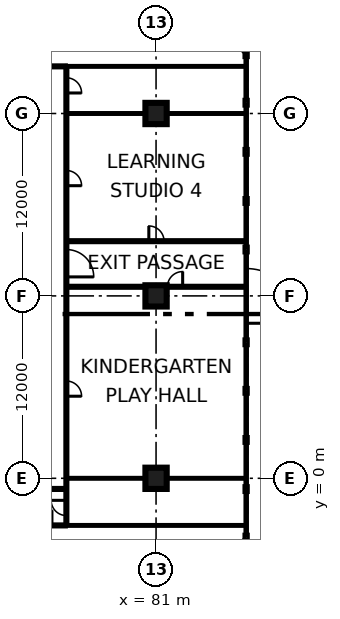
"""IFC4 building model, lengths in metres.
Left out: names, types, materials, properties, quantities, classifications, styles, units other than length and angle.
Written with IfcOpenShell. Run it as: python <this file> out.ifc"""

import sys

from ifc_helpers import new_model, si_unit, direction, frame, frame_2d, origin, origin_2d, place, context, subcontext, project, spatial, rectangle, extrude, element, fill, save


model = new_model("IFC4")
c1 = context("Model", 3, precision=1e-05, world=origin(), true_north=direction((0.0, 1.0)))
c2 = subcontext(c1, "Body", "Model", "MODEL_VIEW")
j1 = project(units=[si_unit("LENGTHUNIT", "METRE"), si_unit("PLANEANGLEUNIT", "RADIAN")], contexts=[c1])
p1 = place(None, origin())
s1 = spatial("IfcSite", under=j1, at=p1, CompositionType="ELEMENT")
p2 = place(p1, origin())
s2 = spatial("IfcBuilding", under=s1, at=p2, CompositionType="ELEMENT")
p3 = place(p2, origin())
s3 = spatial("IfcBuildingStorey", under=s2, at=p3, CompositionType="ELEMENT", Elevation=0.0)
for number, where, z_axis, x_axis in (
    (1, (81.0, 0.0, 0.0), (0.0, 0.0, 1.0), (1.0, 0.0, 0.0)),
    (2, (81.0, 12.0, 0.0), (0.0, 0.0, 1.0), (1.0, 0.0, 0.0)),
    (3, (81.0, 24.0, 0.0), (0.0, 0.0, 1.0), (1.0, 0.0, 0.0)),
):
    element("IfcColumn", number, at=place(p3, frame(where, z_axis=z_axis, x_axis=x_axis)), inside=s3, PredefinedType="COLUMN", context=c2, shape_type="SweptSolid", body=[
        extrude(rectangle(XDim=1.4, YDim=1.4, at=origin_2d()), origin(), (0.0, 0.0, 1.0), 7.2),
    ])
p4 = place(p3, frame((86.925, 9.0, 0.0), z_axis=(0.0, 0.0, 1.0), x_axis=(0.0, 1.0, 0.0)))
e4 = element("IfcWall", 4, at=p4, inside=s3, PredefinedType="SOLIDWALL", context=c2, shape_type="SweptSolid", body=[
    extrude(rectangle(XDim=6.0, YDim=0.15, at=frame_2d((3.0, 0.0))), origin(), (0.0, 0.0, 1.0), 6.8),
])
p5 = place(p4, frame((1.2, 0.0, 0.0)))
e5 = element("IfcOpeningElement", 5, at=p5, cuts=e4, PredefinedType="OPENING", context=c2, shape_type="SweptSolid", body=[
    extrude(rectangle(XDim=3.6, YDim=2.8, at=frame_2d((1.8, 1.4))), frame((0.0, 0.085, 0.0), z_axis=(0.0, -1.0, 0.0), x_axis=(1.0, 0.0, 0.0)), (0.0, 0.0, 1.0), 0.17),
])
p6 = place(p3, frame((-3.2, -3.1, 0.0), z_axis=(0.0, 0.0, 1.0), x_axis=(1.0, 0.0, 0.0)))
e6 = element("IfcWall", 6, at=p6, inside=s3, PredefinedType="PARTITIONING", context=c2, shape_type="SweptSolid", body=[
    extrude(rectangle(XDim=78.3, YDim=0.2, at=frame_2d((39.15, 0.0))), origin(), (0.0, 0.0, 1.0), 6.8),
])
p7 = place(p6, frame((70.1, 0.0, 0.0)))
e7 = element("IfcOpeningElement", 7, at=p7, cuts=e6, PredefinedType="OPENING", context=c2, shape_type="SweptSolid", body=[
    extrude(rectangle(XDim=1.0, YDim=2.1, at=frame_2d((0.5, 1.05))), frame((0.0, 0.11, 0.0), z_axis=(0.0, -1.0, 0.0), x_axis=(1.0, 0.0, 0.0)), (0.0, 0.0, 1.0), 0.22),
])
p8 = place(p6, frame((66.35, 0.0, 0.0)))
e8 = element("IfcOpeningElement", 8, at=p8, cuts=e6, PredefinedType="OPENING", context=c2, shape_type="SweptSolid", body=[
    extrude(rectangle(XDim=1.0, YDim=2.1, at=frame_2d((0.5, 1.05))), frame((0.0, 0.11, 0.0), z_axis=(0.0, -1.0, 0.0), x_axis=(1.0, 0.0, 0.0)), (0.0, 0.0, 1.0), 0.22),
])
p9 = place(p6, frame((76.35, 0.0, 0.0)))
e9 = element("IfcOpeningElement", 9, at=p9, cuts=e6, PredefinedType="OPENING", context=c2, shape_type="SweptSolid", body=[
    extrude(rectangle(XDim=1.0, YDim=2.1, at=frame_2d((0.5, 1.05))), frame((0.0, 0.11, 0.0), z_axis=(0.0, -1.0, 0.0), x_axis=(1.0, 0.0, 0.0)), (0.0, 0.0, 1.0), 0.22),
])
p10 = place(p6, frame((8.6, 0.0, 0.0)))
e10 = element("IfcOpeningElement", 10, at=p10, cuts=e6, PredefinedType="OPENING", context=c2, shape_type="SweptSolid", body=[
    extrude(rectangle(XDim=1.0, YDim=2.1, at=frame_2d((0.5, 1.05))), frame((0.0, 0.11, 0.0), z_axis=(0.0, -1.0, 0.0), x_axis=(1.0, 0.0, 0.0)), (0.0, 0.0, 1.0), 0.22),
])
p11 = place(p6, frame((3.35, 0.0, 0.0)))
e11 = element("IfcOpeningElement", 11, at=p11, cuts=e6, PredefinedType="OPENING", context=c2, shape_type="SweptSolid", body=[
    extrude(rectangle(XDim=1.0, YDim=2.1, at=frame_2d((0.5, 1.05))), frame((0.0, 0.11, 0.0), z_axis=(0.0, -1.0, 0.0), x_axis=(1.0, 0.0, 0.0)), (0.0, 0.0, 1.0), 0.22),
])
p12 = place(p6, frame((20.6, 0.0, 0.0)))
e12 = element("IfcOpeningElement", 12, at=p12, cuts=e6, PredefinedType="OPENING", context=c2, shape_type="SweptSolid", body=[
    extrude(rectangle(XDim=1.0, YDim=2.1, at=frame_2d((0.5, 1.05))), frame((0.0, 0.11, 0.0), z_axis=(0.0, -1.0, 0.0), x_axis=(1.0, 0.0, 0.0)), (0.0, 0.0, 1.0), 0.22),
])
p13 = place(p6, frame((15.35, 0.0, 0.0)))
e13 = element("IfcOpeningElement", 13, at=p13, cuts=e6, PredefinedType="OPENING", context=c2, shape_type="SweptSolid", body=[
    extrude(rectangle(XDim=1.0, YDim=2.1, at=frame_2d((0.5, 1.05))), frame((0.0, 0.11, 0.0), z_axis=(0.0, -1.0, 0.0), x_axis=(1.0, 0.0, 0.0)), (0.0, 0.0, 1.0), 0.22),
])
p14 = place(p6, frame((32.6, 0.0, 0.0)))
e14 = element("IfcOpeningElement", 14, at=p14, cuts=e6, PredefinedType="OPENING", context=c2, shape_type="SweptSolid", body=[
    extrude(rectangle(XDim=1.0, YDim=2.1, at=frame_2d((0.5, 1.05))), frame((0.0, 0.11, 0.0), z_axis=(0.0, -1.0, 0.0), x_axis=(1.0, 0.0, 0.0)), (0.0, 0.0, 1.0), 0.22),
])
p15 = place(p6, frame((27.35, 0.0, 0.0)))
e15 = element("IfcOpeningElement", 15, at=p15, cuts=e6, PredefinedType="OPENING", context=c2, shape_type="SweptSolid", body=[
    extrude(rectangle(XDim=1.0, YDim=2.1, at=frame_2d((0.5, 1.05))), frame((0.0, 0.11, 0.0), z_axis=(0.0, -1.0, 0.0), x_axis=(1.0, 0.0, 0.0)), (0.0, 0.0, 1.0), 0.22),
])
p16 = place(p6, frame((44.85, 0.0, 0.0)))
e16 = element("IfcOpeningElement", 16, at=p16, cuts=e6, PredefinedType="OPENING", context=c2, shape_type="SweptSolid", body=[
    extrude(rectangle(XDim=1.8, YDim=2.1, at=frame_2d((0.9, 1.05))), frame((0.0, 0.11, 0.0), z_axis=(0.0, -1.0, 0.0), x_axis=(1.0, 0.0, 0.0)), (0.0, 0.0, 1.0), 0.22),
])
p17 = place(p6, frame((50.15, 0.0, 0.0)))
e17 = element("IfcOpeningElement", 17, at=p17, cuts=e6, PredefinedType="OPENING", context=c2, shape_type="SweptSolid", body=[
    extrude(rectangle(XDim=1.8, YDim=2.1, at=frame_2d((0.9, 1.05))), frame((0.0, 0.11, 0.0), z_axis=(0.0, -1.0, 0.0), x_axis=(1.0, 0.0, 0.0)), (0.0, 0.0, 1.0), 0.22),
])
p18 = place(p6, frame((53.75, 0.0, 0.0)))
e18 = element("IfcOpeningElement", 18, at=p18, cuts=e6, PredefinedType="OPENING", context=c2, shape_type="SweptSolid", body=[
    extrude(rectangle(XDim=1.8, YDim=2.1, at=frame_2d((0.9, 1.05))), frame((0.0, 0.11, 0.0), z_axis=(0.0, -1.0, 0.0), x_axis=(1.0, 0.0, 0.0)), (0.0, 0.0, 1.0), 0.22),
])
p19 = place(p3, frame((38.3, 27.1, 0.0), z_axis=(0.0, 0.0, 1.0), x_axis=(1.0, 0.0, 0.0)))
e19 = element("IfcWall", 19, at=p19, inside=s3, PredefinedType="PARTITIONING", context=c2, shape_type="SweptSolid", body=[
    extrude(rectangle(XDim=36.8, YDim=0.2, at=frame_2d((18.4, 0.0))), origin(), (0.0, 0.0, 1.0), 6.8),
])
p20 = place(p19, frame((10.8, 0.0, 0.0)))
e20 = element("IfcOpeningElement", 20, at=p20, cuts=e19, PredefinedType="OPENING", context=c2, shape_type="SweptSolid", body=[
    extrude(rectangle(XDim=1.0, YDim=2.1, at=frame_2d((0.5, 1.05))), frame((0.0, 0.11, 0.0), z_axis=(0.0, -1.0, 0.0), x_axis=(1.0, 0.0, 0.0)), (0.0, 0.0, 1.0), 0.22),
])
p21 = place(p19, frame((19.8, 0.0, 0.0)))
e21 = element("IfcOpeningElement", 21, at=p21, cuts=e19, PredefinedType="OPENING", context=c2, shape_type="SweptSolid", body=[
    extrude(rectangle(XDim=1.0, YDim=2.1, at=frame_2d((0.5, 1.05))), frame((0.0, 0.11, 0.0), z_axis=(0.0, -1.0, 0.0), x_axis=(1.0, 0.0, 0.0)), (0.0, 0.0, 1.0), 0.22),
])
p22 = place(p19, frame((28.8, 0.0, 0.0)))
e22 = element("IfcOpeningElement", 22, at=p22, cuts=e19, PredefinedType="OPENING", context=c2, shape_type="SweptSolid", body=[
    extrude(rectangle(XDim=1.0, YDim=2.1, at=frame_2d((0.5, 1.05))), frame((0.0, 0.11, 0.0), z_axis=(0.0, -1.0, 0.0), x_axis=(1.0, 0.0, 0.0)), (0.0, 0.0, 1.0), 0.22),
])
p23 = place(p3, frame((54.0, -0.7, 0.0), z_axis=(0.0, 0.0, 1.0), x_axis=(1.0, 0.0, 0.0)))
e23 = element("IfcWall", 23, at=p23, inside=s3, PredefinedType="PARTITIONING", context=c2, shape_type="SweptSolid", body=[
    extrude(rectangle(XDim=21.0, YDim=0.2, at=frame_2d((10.5, 0.0))), origin(), (0.0, 0.0, 1.0), 6.8),
])
p24 = place(p23, frame((4.1, 0.0, 0.0)))
e24 = element("IfcOpeningElement", 24, at=p24, cuts=e23, PredefinedType="OPENING", context=c2, shape_type="SweptSolid", body=[
    extrude(rectangle(XDim=1.0, YDim=2.1, at=frame_2d((0.5, 1.05))), frame((0.0, 0.11, 0.0), z_axis=(0.0, -1.0, 0.0), x_axis=(1.0, 0.0, 0.0)), (0.0, 0.0, 1.0), 0.22),
])
p25 = place(p3, frame((75.1, -3.1, 0.0), z_axis=(0.0, 0.0, 1.0), x_axis=(1.0, 0.0, 0.0)))
e25 = element("IfcWall", 25, at=p25, inside=s3, PredefinedType="PARTITIONING", context=c2, shape_type="SweptSolid", body=[
    extrude(rectangle(XDim=11.825, YDim=0.125, at=frame_2d((5.913, 0.0))), origin(), (0.0, 0.0, 1.0), 6.8),
])
p26 = place(p3, frame((75.1, -3.0, 0.0), z_axis=(0.0, 0.0, 1.0), x_axis=(0.0, 1.0, 0.0)))
e26 = element("IfcWall", 26, at=p26, inside=s3, PredefinedType="PARTITIONING", context=c2, shape_type="SweptSolid", body=[
    extrude(rectangle(XDim=30.0, YDim=0.2, at=frame_2d((15.0, 0.0))), origin(), (0.0, 0.0, 1.0), 6.8),
])
p27 = place(p26, frame((0.55, 0.0, 0.0)))
e27 = element("IfcOpeningElement", 27, at=p27, cuts=e26, PredefinedType="OPENING", context=c2, shape_type="SweptSolid", body=[
    extrude(rectangle(XDim=1.0, YDim=2.1, at=frame_2d((0.5, 1.05))), frame((0.0, 0.11, 0.0), z_axis=(0.0, -1.0, 0.0), x_axis=(1.0, 0.0, 0.0)), (0.0, 0.0, 1.0), 0.22),
])
p28 = place(p26, frame((8.4, 0.0, 0.0)))
e28 = element("IfcOpeningElement", 28, at=p28, cuts=e26, PredefinedType="OPENING", context=c2, shape_type="SweptSolid", body=[
    extrude(rectangle(XDim=1.0, YDim=2.1, at=frame_2d((0.5, 1.05))), frame((0.0, 0.11, 0.0), z_axis=(0.0, -1.0, 0.0), x_axis=(1.0, 0.0, 0.0)), (0.0, 0.0, 1.0), 0.22),
])
p29 = place(p26, frame((22.25, 0.0, 0.0)))
e29 = element("IfcOpeningElement", 29, at=p29, cuts=e26, PredefinedType="OPENING", context=c2, shape_type="SweptSolid", body=[
    extrude(rectangle(XDim=1.0, YDim=2.1, at=frame_2d((0.5, 1.05))), frame((0.0, 0.11, 0.0), z_axis=(0.0, -1.0, 0.0), x_axis=(1.0, 0.0, 0.0)), (0.0, 0.0, 1.0), 0.22),
])
p30 = place(p26, frame((28.35, 0.0, 0.0)))
e30 = element("IfcOpeningElement", 30, at=p30, cuts=e26, PredefinedType="OPENING", context=c2, shape_type="SweptSolid", body=[
    extrude(rectangle(XDim=1.0, YDim=2.1, at=frame_2d((0.5, 1.05))), frame((0.0, 0.11, 0.0), z_axis=(0.0, -1.0, 0.0), x_axis=(1.0, 0.0, 0.0)), (0.0, 0.0, 1.0), 0.22),
])
p31 = place(p26, frame((16.25, 0.0, 0.0)))
e31 = element("IfcOpeningElement", 31, at=p31, cuts=e26, PredefinedType="OPENING", context=c2, shape_type="SweptSolid", body=[
    extrude(rectangle(XDim=1.8, YDim=2.1, at=frame_2d((0.9, 1.05))), frame((0.0, 0.11, 0.0), z_axis=(0.0, -1.0, 0.0), x_axis=(1.0, 0.0, 0.0)), (0.0, 0.0, 1.0), 0.22),
])
p32 = place(p3, frame((75.1, 27.1, 0.0), z_axis=(0.0, 0.0, 1.0), x_axis=(1.0, 0.0, 0.0)))
e32 = element("IfcWall", 32, at=p32, inside=s3, PredefinedType="PARTITIONING", context=c2, shape_type="SweptSolid", body=[
    extrude(rectangle(XDim=11.825, YDim=0.125, at=frame_2d((5.913, 0.0))), origin(), (0.0, 0.0, 1.0), 6.8),
])
p33 = place(p3, frame((75.2, 0.0, 0.0), z_axis=(0.0, 0.0, 1.0), x_axis=(1.0, 0.0, 0.0)))
e33 = element("IfcWall", 33, at=p33, inside=s3, PredefinedType="PARTITIONING", context=c2, shape_type="SweptSolid", body=[
    extrude(rectangle(XDim=11.725, YDim=0.125, at=frame_2d((5.863, 0.0))), origin(), (0.0, 0.0, 1.0), 6.8),
])
p34 = place(p3, frame((75.2, 12.6, 0.0), z_axis=(0.0, 0.0, 1.0), x_axis=(1.0, 0.0, 0.0)))
e34 = element("IfcWall", 34, at=p34, inside=s3, PredefinedType="PARTITIONING", context=c2, shape_type="SweptSolid", body=[
    extrude(rectangle(XDim=11.651, YDim=0.2, at=frame_2d((5.826, 0.0))), origin(), (0.0, 0.0, 1.0), 6.8),
])
p35 = place(p34, frame((6.55, 0.0, 0.0)))
e35 = element("IfcOpeningElement", 35, at=p35, cuts=e34, PredefinedType="OPENING", context=c2, shape_type="SweptSolid", body=[
    extrude(rectangle(XDim=1.0, YDim=2.1, at=frame_2d((0.5, 1.05))), frame((0.0, 0.11, 0.0), z_axis=(0.0, -1.0, 0.0), x_axis=(1.0, 0.0, 0.0)), (0.0, 0.0, 1.0), 0.22),
])
p36 = place(p3, frame((75.2, 15.6, 0.0), z_axis=(0.0, 0.0, 1.0), x_axis=(1.0, 0.0, 0.0)))
e36 = element("IfcWall", 36, at=p36, inside=s3, PredefinedType="PARTITIONING", context=c2, shape_type="SweptSolid", body=[
    extrude(rectangle(XDim=11.725, YDim=0.2, at=frame_2d((5.863, 0.0))), origin(), (0.0, 0.0, 1.0), 6.8),
])
p37 = place(p36, frame((5.325, 0.0, 0.0)))
e37 = element("IfcOpeningElement", 37, at=p37, cuts=e36, PredefinedType="OPENING", context=c2, shape_type="SweptSolid", body=[
    extrude(rectangle(XDim=1.0, YDim=2.1, at=frame_2d((0.5, 1.05))), frame((0.0, 0.11, 0.0), z_axis=(0.0, -1.0, 0.0), x_axis=(1.0, 0.0, 0.0)), (0.0, 0.0, 1.0), 0.22),
])
p38 = place(p3, frame((75.2, 24.0, 0.0), z_axis=(0.0, 0.0, 1.0), x_axis=(1.0, 0.0, 0.0)))
e38 = element("IfcWall", 38, at=p38, inside=s3, PredefinedType="PARTITIONING", context=c2, shape_type="SweptSolid", body=[
    extrude(rectangle(XDim=11.725, YDim=0.125, at=frame_2d((5.863, 0.0))), origin(), (0.0, 0.0, 1.0), 6.8),
])
p39 = place(p5, frame((3.6, 0.0, 0.0), z_axis=(0.0, 0.0, 1.0), x_axis=(-1.0, 0.0, 0.0)))
e39 = element("IfcDoor", 39, at=p39, inside=s3, OperationType="DOUBLE_DOOR_SINGLE_SWING", PredefinedType="DOOR", context=c2, shape_type="SweptSolid", body=[
    extrude(rectangle(XDim=3.6, YDim=2.8, at=frame_2d((1.8, 1.4))), frame((0.0, 0.025, 0.0), z_axis=(0.0, -1.0, 0.0), x_axis=(1.0, 0.0, 0.0)), (0.0, 0.0, 1.0), 0.05),
])
fill(e5, e39)
p40 = place(p27, frame((1.0, 0.0, 0.0), z_axis=(0.0, 0.0, 1.0), x_axis=(-1.0, 0.0, 0.0)))
e40 = element("IfcDoor", 40, at=p40, inside=s3, OperationType="SINGLE_SWING_RIGHT", PredefinedType="DOOR", context=c2, shape_type="SweptSolid", body=[
    extrude(rectangle(XDim=1.0, YDim=2.1, at=frame_2d((0.5, 1.05))), frame((0.0, 0.025, 0.0), z_axis=(0.0, -1.0, 0.0), x_axis=(1.0, 0.0, 0.0)), (0.0, 0.0, 1.0), 0.05),
])
fill(e27, e40)
p41 = place(p28, frame((1.0, 0.0, 0.0), z_axis=(0.0, 0.0, 1.0), x_axis=(-1.0, 0.0, 0.0)))
e41 = element("IfcDoor", 41, at=p41, inside=s3, OperationType="SINGLE_SWING_LEFT", PredefinedType="DOOR", context=c2, shape_type="SweptSolid", body=[
    extrude(rectangle(XDim=1.0, YDim=2.1, at=frame_2d((0.5, 1.05))), frame((0.0, 0.025, 0.0), z_axis=(0.0, -1.0, 0.0), x_axis=(1.0, 0.0, 0.0)), (0.0, 0.0, 1.0), 0.05),
])
fill(e28, e41)
p42 = place(p35, frame((1.0, 0.0, 0.0), z_axis=(0.0, 0.0, 1.0), x_axis=(-1.0, 0.0, 0.0)))
e42 = element("IfcDoor", 42, at=p42, inside=s3, OperationType="SINGLE_SWING_RIGHT", PredefinedType="DOOR", context=c2, shape_type="SweptSolid", body=[
    extrude(rectangle(XDim=1.0, YDim=2.1, at=frame_2d((0.5, 1.05))), frame((0.0, 0.025, 0.0), z_axis=(0.0, -1.0, 0.0), x_axis=(1.0, 0.0, 0.0)), (0.0, 0.0, 1.0), 0.05),
])
fill(e35, e42)
p43 = place(p37, origin())
e43 = element("IfcDoor", 43, at=p43, inside=s3, OperationType="SINGLE_SWING_LEFT", PredefinedType="DOOR", context=c2, shape_type="SweptSolid", body=[
    extrude(rectangle(XDim=1.0, YDim=2.1, at=frame_2d((0.5, 1.05))), frame((0.0, 0.025, 0.0), z_axis=(0.0, -1.0, 0.0), x_axis=(1.0, 0.0, 0.0)), (0.0, 0.0, 1.0), 0.05),
])
fill(e37, e43)
p44 = place(p29, frame((1.0, 0.0, 0.0), z_axis=(0.0, 0.0, 1.0), x_axis=(-1.0, 0.0, 0.0)))
e44 = element("IfcDoor", 44, at=p44, inside=s3, OperationType="SINGLE_SWING_LEFT", PredefinedType="DOOR", context=c2, shape_type="SweptSolid", body=[
    extrude(rectangle(XDim=1.0, YDim=2.1, at=frame_2d((0.5, 1.05))), frame((0.0, 0.025, 0.0), z_axis=(0.0, -1.0, 0.0), x_axis=(1.0, 0.0, 0.0)), (0.0, 0.0, 1.0), 0.05),
])
fill(e29, e44)
p45 = place(p30, frame((1.0, 0.0, 0.0), z_axis=(0.0, 0.0, 1.0), x_axis=(-1.0, 0.0, 0.0)))
e45 = element("IfcDoor", 45, at=p45, inside=s3, OperationType="SINGLE_SWING_LEFT", PredefinedType="DOOR", context=c2, shape_type="SweptSolid", body=[
    extrude(rectangle(XDim=1.0, YDim=2.1, at=frame_2d((0.5, 1.05))), frame((0.0, 0.025, 0.0), z_axis=(0.0, -1.0, 0.0), x_axis=(1.0, 0.0, 0.0)), (0.0, 0.0, 1.0), 0.05),
])
fill(e30, e45)
p46 = place(p31, frame((1.8, 0.0, 0.0), z_axis=(0.0, 0.0, 1.0), x_axis=(-1.0, 0.0, 0.0)))
e46 = element("IfcDoor", 46, at=p46, inside=s3, OperationType="DOUBLE_DOOR_SINGLE_SWING", PredefinedType="DOOR", context=c2, shape_type="SweptSolid", body=[
    extrude(rectangle(XDim=1.8, YDim=2.1, at=frame_2d((0.9, 1.05))), frame((0.0, 0.025, 0.0), z_axis=(0.0, -1.0, 0.0), x_axis=(1.0, 0.0, 0.0)), (0.0, 0.0, 1.0), 0.05),
])
fill(e31, e46)
save(model, sys.argv[1])
